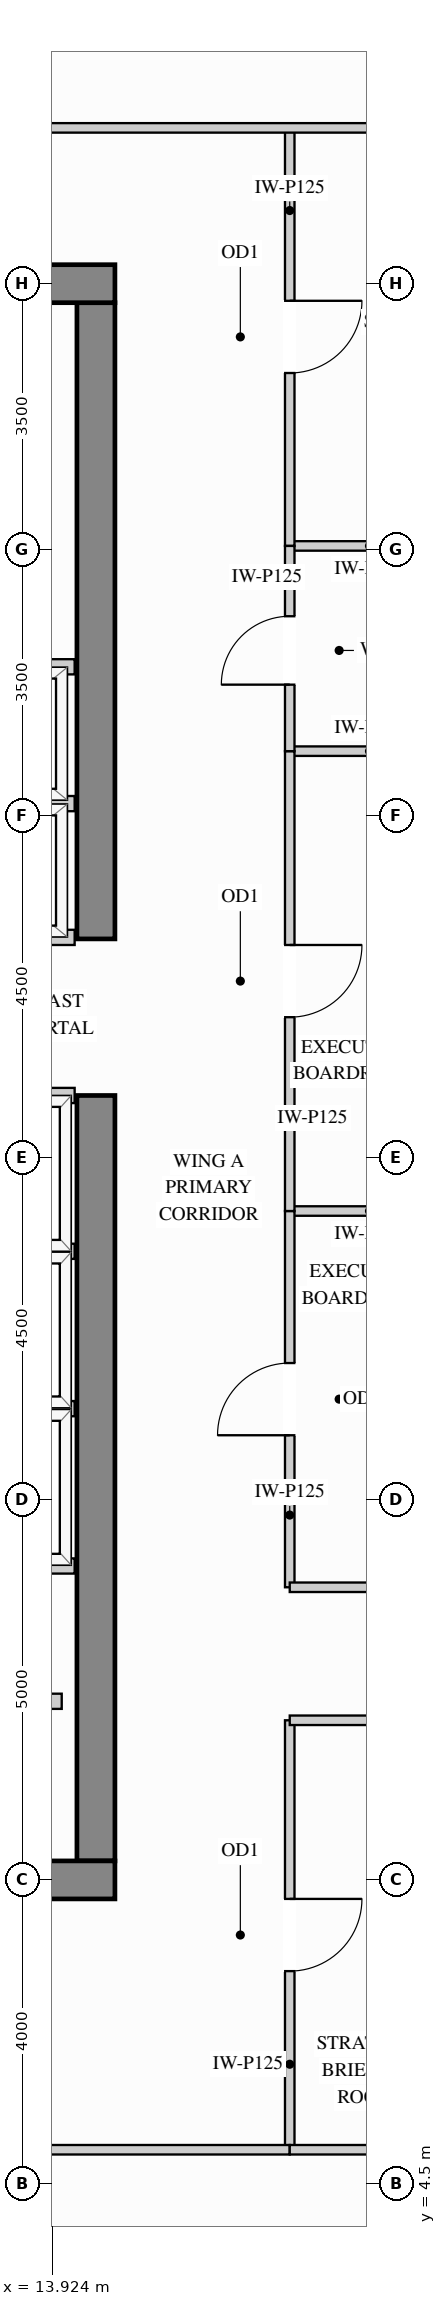
"""IFC4 building model, lengths in metres.
Left out: names, types, materials, properties, quantities, classifications, styles, units other than length and angle.
Written with IfcOpenShell. Run it as: python <this file> out.ifc"""

import sys

from ifc_helpers import new_model, si_unit, direction, frame, frame_2d, origin, place, context, subcontext, project, spatial, rectangle, extrude, source, transform, mapped, element, fill, save


model = new_model("IFC4")
c1 = context("Model", 3, precision=1e-05, world=origin(), true_north=direction((0.0, 1.0)))
c2 = subcontext(c1, "Body", "Model", "MODEL_VIEW")
j1 = project(units=[si_unit("LENGTHUNIT", "METRE"), si_unit("PLANEANGLEUNIT", "RADIAN")], contexts=[c1])
p1 = place(None, origin())
s1 = spatial("IfcSite", under=j1, at=p1, CompositionType="ELEMENT")
p2 = place(p1, origin())
s2 = spatial("IfcBuilding", under=s1, at=p2, CompositionType="ELEMENT")
p3 = place(p2, frame((0.0, 0.0, 223.2)))
s3 = spatial("IfcBuildingStorey", under=s2, at=p3, CompositionType="ELEMENT", Elevation=223.2)
m1 = source(origin(), c2, "Body", "SweptSolid", [
    extrude(rectangle(XDim=10.07, YDim=0.5, at=frame_2d((5.035, 0.0))), origin(), (0.0, 0.0, 1.0), 3.4),
])
p4 = place(p3, frame((14.5, 8.75, 0.0), z_axis=(0.0, 0.0, 1.0), x_axis=(0.0, 1.0, 0.0)))
e1 = element("IfcWall", 1, at=p4, inside=s3, PredefinedType="SHEAR", context=c2, shape_type="MappedRepresentation", body=[
    mapped(m1, transform((0.0, 0.0, 0.0), x_axis=(1.0, 0.0, 0.0), y_axis=(0.0, 1.0, 0.0), z_axis=(0.0, 0.0, 1.0))),
])
m2 = source(origin(), c2, "Body", "SweptSolid", [
    extrude(rectangle(XDim=8.37, YDim=0.5, at=frame_2d((4.185, 0.0))), origin(), (0.0, 0.0, 1.0), 3.4),
])
p5 = place(p3, frame((14.5, 20.88, 0.0), z_axis=(0.0, 0.0, 1.0), x_axis=(0.0, 1.0, 0.0)))
e2 = element("IfcWall", 2, at=p5, inside=s3, PredefinedType="SHEAR", context=c2, shape_type="MappedRepresentation", body=[
    mapped(m2, transform((0.0, 0.0, 0.0), x_axis=(1.0, 0.0, 0.0), y_axis=(0.0, 1.0, 0.0), z_axis=(0.0, 0.0, 1.0))),
])
m3 = source(origin(), c2, "Body", "SweptSolid", [
    extrude(rectangle(XDim=10.5, YDim=0.5, at=frame_2d((5.25, 0.0))), origin(), (0.0, 0.0, 1.0), 3.4),
])
for number, where, z_axis, x_axis in (
    (3, (4.25, 29.5, 0.0), (0.0, 0.0, 1.0), (1.0, 0.0, 0.0)),
    (4, (4.25, 8.5, 0.0), (0.0, 0.0, 1.0), (1.0, 0.0, 0.0)),
):
    element("IfcWall", number, at=place(p3, frame(where, z_axis=z_axis, x_axis=x_axis)), inside=s3, PredefinedType="SHEAR", context=c2, shape_type="MappedRepresentation", body=[
        mapped(m3, transform((0.0, 0.0, 0.0), x_axis=(1.0, 0.0, 0.0), y_axis=(0.0, 1.0, 0.0), z_axis=(0.0, 0.0, 1.0))),
    ])
m4 = source(origin(), c2, "Body", "SweptSolid", [
    extrude(rectangle(XDim=2.098, YDim=0.125, at=frame_2d((1.049, 0.0))), origin(), (0.0, 0.0, 1.0), 3.385),
])
for number, where, z_axis, x_axis in (
    (5, (17.05, 17.3, 0.0), (0.0, 0.0, 1.0), (1.0, 0.0, 0.0)),
    (6, (17.05, 23.35, 0.0), (0.0, 0.0, 1.0), (1.0, 0.0, 0.0)),
    (7, (17.05, 26.05, 0.0), (0.0, 0.0, 1.0), (1.0, 0.0, 0.0)),
):
    element("IfcWall", number, at=place(p3, frame(where, z_axis=z_axis, x_axis=x_axis)), inside=s3, PredefinedType="PARTITIONING", context=c2, shape_type="MappedRepresentation", body=[
        mapped(m4, transform((0.0, 0.0, 0.0), x_axis=(1.0, 0.0, 0.0), y_axis=(0.0, 1.0, 0.0), z_axis=(0.0, 0.0, 1.0))),
    ])
p6 = place(p3, frame((17.05, 12.35, 0.0), z_axis=(0.0, 0.0, 1.0), x_axis=(0.0, 1.0, 0.0)))
e8 = element("IfcWall", 8, at=p6, inside=s3, PredefinedType="PARTITIONING", context=c2, shape_type="SweptSolid", body=[
    extrude(rectangle(XDim=4.95, YDim=0.125, at=frame_2d((2.475, 0.0))), origin(), (0.0, 0.0, 1.0), 3.385),
])
p7 = place(p6, frame((2.0, 0.0, 0.0)))
e9 = element("IfcOpeningElement", 9, at=p7, cuts=e8, PredefinedType="OPENING", context=c2, shape_type="SweptSolid", body=[
    extrude(rectangle(XDim=0.95, YDim=2.15, at=frame_2d((0.475, 1.075))), frame((0.0, 0.073, 0.0), z_axis=(0.0, -1.0, 0.0), x_axis=(1.0, 0.0, 0.0)), (0.0, 0.0, 1.0), 0.145),
])
p8 = place(p3, frame((17.05, 17.3, 0.0), z_axis=(0.0, 0.0, 1.0), x_axis=(0.0, 1.0, 0.0)))
e10 = element("IfcWall", 10, at=p8, inside=s3, PredefinedType="PARTITIONING", context=c2, shape_type="SweptSolid", body=[
    extrude(rectangle(XDim=6.05, YDim=0.125, at=frame_2d((3.025, 0.0))), origin(), (0.0, 0.0, 1.0), 3.385),
])
p9 = place(p8, frame((2.55, 0.0, 0.0)))
e11 = element("IfcOpeningElement", 11, at=p9, cuts=e10, PredefinedType="OPENING", context=c2, shape_type="SweptSolid", body=[
    extrude(rectangle(XDim=0.95, YDim=2.15, at=frame_2d((0.475, 1.075))), frame((0.0, 0.073, 0.0), z_axis=(0.0, -1.0, 0.0), x_axis=(1.0, 0.0, 0.0)), (0.0, 0.0, 1.0), 0.145),
])
p10 = place(p3, frame((17.05, 26.05, 0.0), z_axis=(0.0, 0.0, 1.0), x_axis=(0.0, 1.0, 0.0)))
e12 = element("IfcWall", 12, at=p10, inside=s3, PredefinedType="PARTITIONING", context=c2, shape_type="SweptSolid", body=[
    extrude(rectangle(XDim=5.5, YDim=0.125, at=frame_2d((2.75, 0.0))), origin(), (0.0, 0.0, 1.0), 3.385),
])
p11 = place(p10, frame((2.275, 0.0, 0.0)))
e13 = element("IfcOpeningElement", 13, at=p11, cuts=e12, PredefinedType="OPENING", context=c2, shape_type="SweptSolid", body=[
    extrude(rectangle(XDim=0.95, YDim=2.15, at=frame_2d((0.475, 1.075))), frame((0.0, 0.073, 0.0), z_axis=(0.0, -1.0, 0.0), x_axis=(1.0, 0.0, 0.0)), (0.0, 0.0, 1.0), 0.145),
])
p12 = place(p3, frame((17.05, 4.95, 0.0), z_axis=(0.0, 0.0, 1.0), x_axis=(0.0, 1.0, 0.0)))
e14 = element("IfcWall", 14, at=p12, inside=s3, PredefinedType="PARTITIONING", context=c2, shape_type="SweptSolid", body=[
    extrude(rectangle(XDim=5.65, YDim=0.125, at=frame_2d((2.825, 0.0))), origin(), (0.0, 0.0, 1.0), 3.385),
])
p13 = place(p12, frame((2.35, 0.0, 0.0)))
e15 = element("IfcOpeningElement", 15, at=p13, cuts=e14, PredefinedType="OPENING", context=c2, shape_type="SweptSolid", body=[
    extrude(rectangle(XDim=0.95, YDim=2.15, at=frame_2d((0.475, 1.075))), frame((0.0, 0.073, 0.0), z_axis=(0.0, -1.0, 0.0), x_axis=(1.0, 0.0, 0.0)), (0.0, 0.0, 1.0), 0.145),
])
p14 = place(p3, frame((17.05, 23.35, 0.0), z_axis=(0.0, 0.0, 1.0), x_axis=(0.0, 1.0, 0.0)))
e16 = element("IfcWall", 16, at=p14, inside=s3, PredefinedType="PARTITIONING", context=c2, shape_type="SweptSolid", body=[
    extrude(rectangle(XDim=2.7, YDim=0.125, at=frame_2d((1.35, 0.0))), origin(), (0.0, 0.0, 1.0), 3.385),
])
p15 = place(p14, frame((0.875, 0.0, 0.0)))
e17 = element("IfcOpeningElement", 17, at=p15, cuts=e16, PredefinedType="OPENING", context=c2, shape_type="SweptSolid", body=[
    extrude(rectangle(XDim=0.9, YDim=2.15, at=frame_2d((0.45, 1.075))), frame((0.0, 0.073, 0.0), z_axis=(0.0, -1.0, 0.0), x_axis=(1.0, 0.0, 0.0)), (0.0, 0.0, 1.0), 0.145),
])
m5 = source(origin(), c2, "Body", "SweptSolid", [
    extrude(rectangle(XDim=5.798, YDim=0.125, at=frame_2d((2.899, 0.0))), origin(), (0.0, 0.0, 1.0), 3.385),
])
p16 = place(p3, frame((13.35, 31.55, 0.0), z_axis=(0.0, 0.0, 1.0), x_axis=(1.0, 0.0, 0.0)))
e18 = element("IfcWall", 18, at=p16, inside=s3, PredefinedType="PARTITIONING", context=c2, shape_type="MappedRepresentation", body=[
    mapped(m5, transform((0.0, 0.0, 0.0), x_axis=(1.0, 0.0, 0.0), y_axis=(0.0, 1.0, 0.0), z_axis=(0.0, 0.0, 1.0))),
])
m6 = source(origin(), c2, "Body", "SweptSolid", [
    extrude(rectangle(XDim=2.45, YDim=0.125, at=frame_2d((1.225, 0.0))), origin(), (0.0, 0.0, 1.0), 3.385),
])
for number, where, z_axis, x_axis in (
    (19, (17.05, 12.35, 0.0), (0.0, 0.0, 1.0), (1.0, 0.0, 0.0)),
    (20, (17.05, 10.6, 0.0), (0.0, 0.0, 1.0), (1.0, 0.0, 0.0)),
):
    element("IfcWall", number, at=place(p3, frame(where, z_axis=z_axis, x_axis=x_axis)), inside=s3, PredefinedType="PARTITIONING", context=c2, shape_type="MappedRepresentation", body=[
        mapped(m6, transform((0.0, 0.0, 0.0), x_axis=(1.0, 0.0, 0.0), y_axis=(0.0, 1.0, 0.0), z_axis=(0.0, 0.0, 1.0))),
    ])
p17 = place(p3, frame((2.45, 4.95, 0.0), z_axis=(0.0, 0.0, 1.0), x_axis=(1.0, 0.0, 0.0)))
e21 = element("IfcWall", 21, at=p17, inside=s3, PredefinedType="PARTITIONING", context=c2, shape_type="SweptSolid", body=[
    extrude(rectangle(XDim=14.6, YDim=0.125, at=frame_2d((7.3, 0.0))), origin(), (0.0, 0.0, 1.0), 2.848),
])
p18 = place(p17, frame((6.825, 0.0, 0.0)))
e22 = element("IfcOpeningElement", 22, at=p18, cuts=e21, PredefinedType="OPENING", context=c2, shape_type="SweptSolid", body=[
    extrude(rectangle(XDim=0.95, YDim=2.15, at=frame_2d((0.475, 1.075))), frame((0.0, 0.073, 0.0), z_axis=(0.0, -1.0, 0.0), x_axis=(1.0, 0.0, 0.0)), (0.0, 0.0, 1.0), 0.145),
])
m7 = source(origin(), c2, "Body", "SweptSolid", [
    extrude(rectangle(XDim=2.098, YDim=0.125, at=frame_2d((1.049, 0.0))), origin(), (0.0, 0.0, 1.0), 2.848),
])
p19 = place(p3, frame((17.05, 4.95, 0.0), z_axis=(0.0, 0.0, 1.0), x_axis=(1.0, 0.0, 0.0)))
e23 = element("IfcWall", 23, at=p19, inside=s3, PredefinedType="PARTITIONING", context=c2, shape_type="MappedRepresentation", body=[
    mapped(m7, transform((0.0, 0.0, 0.0), x_axis=(1.0, 0.0, 0.0), y_axis=(0.0, 1.0, 0.0), z_axis=(0.0, 0.0, 1.0))),
])
m8 = source(origin(), c2, "Body", "SweptSolid", [
    extrude(rectangle(XDim=1.63, YDim=0.2, at=frame_2d((0.815, 0.0))), origin(), (0.0, 0.0, 1.0), 3.385),
])
p20 = place(p3, frame((12.42, 10.85, 0.0), z_axis=(0.0, 0.0, 1.0), x_axis=(1.0, 0.0, 0.0)))
e24 = element("IfcWall", 24, at=p20, inside=s3, PredefinedType="PARTITIONING", context=c2, shape_type="MappedRepresentation", body=[
    mapped(m8, transform((0.0, 0.0, 0.0), x_axis=(1.0, 0.0, 0.0), y_axis=(0.0, 1.0, 0.0), z_axis=(0.0, 0.0, 1.0))),
])
m9 = source(origin(), c2, "Body", "SweptSolid", [
    extrude(rectangle(XDim=2.39, YDim=0.2, at=frame_2d((1.195, 0.0))), origin(), (0.0, 0.0, 1.0), 3.385),
])
for number, where, z_axis, x_axis in (
    (25, (11.83, 22.66, 0.0), (0.0, 0.0, 1.0), (1.0, 0.0, 0.0)),
    (26, (11.83, 20.9, 0.0), (0.0, 0.0, 1.0), (1.0, 0.0, 0.0)),
    (27, (11.83, 24.46, 0.0), (0.0, 0.0, 1.0), (1.0, 0.0, 0.0)),
):
    element("IfcWall", number, at=place(p3, frame(where, z_axis=z_axis, x_axis=x_axis)), inside=s3, PredefinedType="PARTITIONING", context=c2, shape_type="MappedRepresentation", body=[
        mapped(m9, transform((0.0, 0.0, 0.0), x_axis=(1.0, 0.0, 0.0), y_axis=(0.0, 1.0, 0.0), z_axis=(0.0, 0.0, 1.0))),
    ])
m10 = source(origin(), c2, "Body", "SweptSolid", [
    extrude(rectangle(XDim=1.99, YDim=0.2, at=frame_2d((0.995, 0.0))), origin(), (0.0, 0.0, 1.0), 3.385),
])
for number, where, z_axis, x_axis in (
    (28, (12.23, 14.7, 0.0), (0.0, 0.0, 1.0), (1.0, 0.0, 0.0)),
    (29, (12.23, 12.63, 0.0), (0.0, 0.0, 1.0), (1.0, 0.0, 0.0)),
    (30, (12.23, 16.77, 0.0), (0.0, 0.0, 1.0), (1.0, 0.0, 0.0)),
    (31, (12.23, 18.82, 0.0), (0.0, 0.0, 1.0), (1.0, 0.0, 0.0)),
):
    element("IfcWall", number, at=place(p3, frame(where, z_axis=z_axis, x_axis=x_axis)), inside=s3, PredefinedType="PARTITIONING", context=c2, shape_type="MappedRepresentation", body=[
        mapped(m10, transform((0.0, 0.0, 0.0), x_axis=(1.0, 0.0, 0.0), y_axis=(0.0, 1.0, 0.0), z_axis=(0.0, 0.0, 1.0))),
    ])
m11 = source(origin(), c2, "Body", "SweptSolid", [
    extrude(rectangle(XDim=0.95, YDim=2.15, at=frame_2d((0.475, 1.075))), frame((0.0, 0.025, 0.0), z_axis=(0.0, -1.0, 0.0), x_axis=(1.0, 0.0, 0.0)), (0.0, 0.0, 1.0), 0.05),
])
p21 = place(p13, origin())
e32 = element("IfcDoor", 32, at=p21, inside=s3, OperationType="SINGLE_SWING_RIGHT", PredefinedType="DOOR", context=c2, shape_type="MappedRepresentation", body=[
    mapped(m11, transform((0.0, 0.0, 0.0), x_axis=(1.0, 0.0, 0.0), y_axis=(0.0, 1.0, 0.0), z_axis=(0.0, 0.0, 1.0))),
])
fill(e15, e32)
p22 = place(p7, origin())
e33 = element("IfcDoor", 33, at=p22, inside=s3, OperationType="SINGLE_SWING_LEFT", PredefinedType="DOOR", context=c2, shape_type="MappedRepresentation", body=[
    mapped(m11, transform((0.0, 0.0, 0.0), x_axis=(1.0, 0.0, 0.0), y_axis=(0.0, 1.0, 0.0), z_axis=(0.0, 0.0, 1.0))),
])
fill(e9, e33)
p23 = place(p9, origin())
e34 = element("IfcDoor", 34, at=p23, inside=s3, OperationType="SINGLE_SWING_RIGHT", PredefinedType="DOOR", context=c2, shape_type="MappedRepresentation", body=[
    mapped(m11, transform((0.0, 0.0, 0.0), x_axis=(1.0, 0.0, 0.0), y_axis=(0.0, 1.0, 0.0), z_axis=(0.0, 0.0, 1.0))),
])
fill(e11, e34)
p24 = place(p11, origin())
e35 = element("IfcDoor", 35, at=p24, inside=s3, OperationType="SINGLE_SWING_RIGHT", PredefinedType="DOOR", context=c2, shape_type="MappedRepresentation", body=[
    mapped(m11, transform((0.0, 0.0, 0.0), x_axis=(1.0, 0.0, 0.0), y_axis=(0.0, 1.0, 0.0), z_axis=(0.0, 0.0, 1.0))),
])
fill(e13, e35)
m12 = source(origin(), c2, "Body", "SweptSolid", [
    extrude(rectangle(XDim=0.9, YDim=2.15, at=frame_2d((0.45, 1.075))), frame((0.0, 0.025, 0.0), z_axis=(0.0, -1.0, 0.0), x_axis=(1.0, 0.0, 0.0)), (0.0, 0.0, 1.0), 0.05),
])
p25 = place(p15, origin())
e36 = element("IfcDoor", 36, at=p25, inside=s3, OperationType="SINGLE_SWING_LEFT", PredefinedType="DOOR", context=c2, shape_type="MappedRepresentation", body=[
    mapped(m12, transform((0.0, 0.0, 0.0), x_axis=(1.0, 0.0, 0.0), y_axis=(0.0, 1.0, 0.0), z_axis=(0.0, 0.0, 1.0))),
])
fill(e17, e36)
save(model, sys.argv[1])
